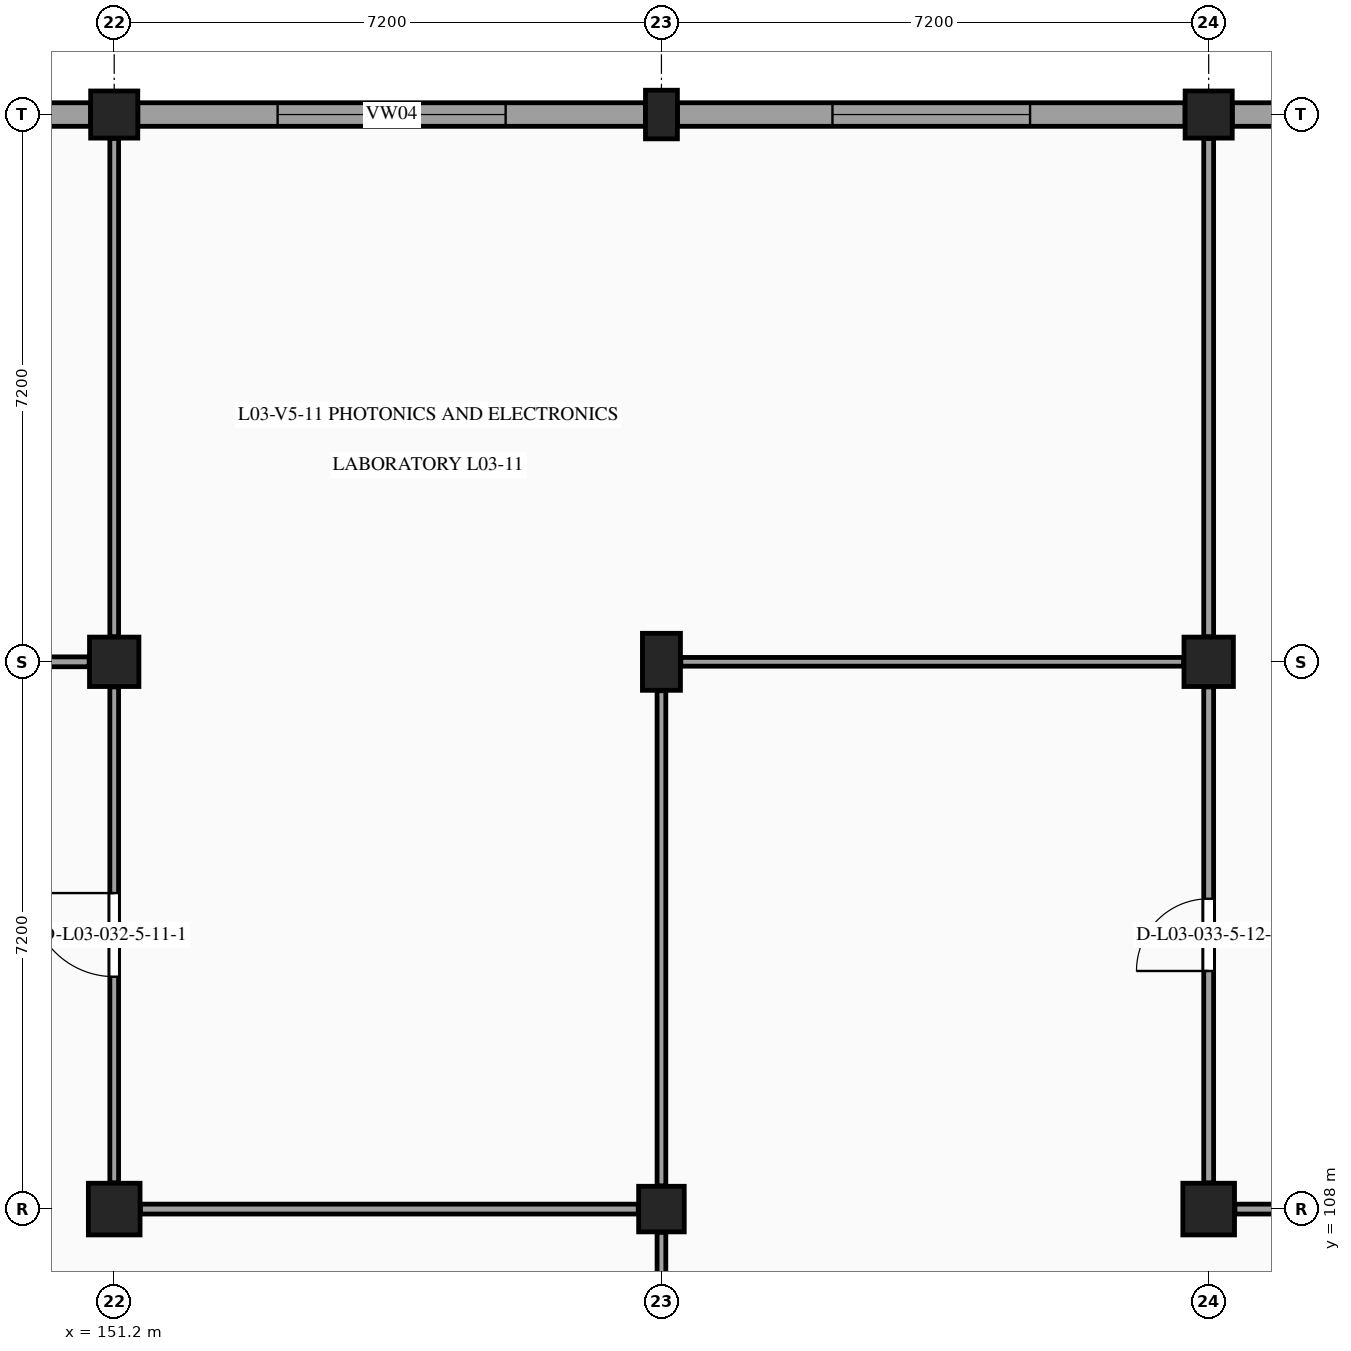
"""IFC4 building model, lengths in metres.
Left out: names, types, materials, properties, quantities, classifications, styles, units other than length and angle.
Written with IfcOpenShell. Run it as: python <this file> out.ifc"""

import sys

from ifc_helpers import new_model, si_unit, direction, frame, frame_2d, origin, origin_2d, place, context, subcontext, project, spatial, rectangle, extrude, element, fill, save


model = new_model("IFC4")
c1 = context("Model", 3, precision=1e-05, world=origin(), true_north=direction((0.0, 1.0)))
c2 = subcontext(c1, "Body", "Model", "MODEL_VIEW")
j1 = project(units=[si_unit("LENGTHUNIT", "METRE"), si_unit("PLANEANGLEUNIT", "RADIAN")], contexts=[c1])
p1 = place(None, origin())
s1 = spatial("IfcSite", under=j1, at=p1, CompositionType="ELEMENT")
p2 = place(p1, origin())
s2 = spatial("IfcBuilding", under=s1, at=p2, CompositionType="ELEMENT")
p3 = place(p2, frame((0.0, 0.0, 14.4)))
s3 = spatial("IfcBuildingStorey", under=s2, at=p3, CompositionType="ELEMENT", Elevation=14.4)
p4 = place(p3, frame((151.2, 108.0, 0.0), z_axis=(0.0, 0.0, 1.0), x_axis=(1.0, 0.0, 0.0)))
e1 = element("IfcColumn", 1, at=p4, inside=s3, PredefinedType="COLUMN", context=c2, shape_type="SweptSolid", body=[
    extrude(rectangle(XDim=0.68, YDim=0.68, at=origin_2d()), origin(), (0.0, 0.0, 1.0), 4.2),
])
p5 = place(p3, frame((151.2, 115.2, 0.0), z_axis=(0.0, 0.0, 1.0), x_axis=(1.0, 0.0, 0.0)))
e2 = element("IfcColumn", 2, at=p5, inside=s3, PredefinedType="COLUMN", context=c2, shape_type="SweptSolid", body=[
    extrude(rectangle(XDim=0.65, YDim=0.65, at=origin_2d()), origin(), (0.0, 0.0, 1.0), 4.2),
])
p6 = place(p3, frame((151.2, 122.4, 0.0), z_axis=(0.0, 0.0, 1.0), x_axis=(1.0, 0.0, 0.0)))
e3 = element("IfcColumn", 3, at=p6, inside=s3, PredefinedType="COLUMN", context=c2, shape_type="SweptSolid", body=[
    extrude(rectangle(XDim=0.62, YDim=0.62, at=origin_2d()), origin(), (0.0, 0.0, 1.0), 4.2),
])
p7 = place(p3, frame((158.4, 108.0, 0.0), z_axis=(0.0, 0.0, 1.0), x_axis=(1.0, 0.0, 0.0)))
e4 = element("IfcColumn", 4, at=p7, inside=s3, PredefinedType="COLUMN", context=c2, shape_type="SweptSolid", body=[
    extrude(rectangle(XDim=0.6, YDim=0.6, at=origin_2d()), origin(), (0.0, 0.0, 1.0), 4.2),
])
p8 = place(p3, frame((158.4, 115.2, 0.0), z_axis=(0.0, 0.0, 1.0), x_axis=(1.0, 0.0, 0.0)))
e5 = element("IfcColumn", 5, at=p8, inside=s3, PredefinedType="COLUMN", context=c2, shape_type="SweptSolid", body=[
    extrude(rectangle(XDim=0.5, YDim=0.75, at=origin_2d()), origin(), (0.0, 0.0, 1.0), 4.2),
])
p9 = place(p3, frame((158.4, 122.4, 0.0), z_axis=(0.0, 0.0, 1.0), x_axis=(1.0, 0.0, 0.0)))
e6 = element("IfcColumn", 6, at=p9, inside=s3, PredefinedType="PILASTER", context=c2, shape_type="SweptSolid", body=[
    extrude(rectangle(XDim=0.42, YDim=0.64, at=origin_2d()), origin(), (0.0, 0.0, 1.0), 4.2),
])
p10 = place(p3, frame((165.6, 108.0, 0.0), z_axis=(0.0, 0.0, 1.0), x_axis=(1.0, 0.0, 0.0)))
e7 = element("IfcColumn", 7, at=p10, inside=s3, PredefinedType="COLUMN", context=c2, shape_type="SweptSolid", body=[
    extrude(rectangle(XDim=0.68, YDim=0.68, at=origin_2d()), origin(), (0.0, 0.0, 1.0), 4.2),
])
p11 = place(p3, frame((165.6, 115.2, 0.0), z_axis=(0.0, 0.0, 1.0), x_axis=(1.0, 0.0, 0.0)))
e8 = element("IfcColumn", 8, at=p11, inside=s3, PredefinedType="COLUMN", context=c2, shape_type="SweptSolid", body=[
    extrude(rectangle(XDim=0.65, YDim=0.65, at=origin_2d()), origin(), (0.0, 0.0, 1.0), 4.2),
])
p12 = place(p3, frame((165.6, 122.4, 0.0), z_axis=(0.0, 0.0, 1.0), x_axis=(1.0, 0.0, 0.0)))
e9 = element("IfcColumn", 9, at=p12, inside=s3, PredefinedType="COLUMN", context=c2, shape_type="SweptSolid", body=[
    extrude(rectangle(XDim=0.62, YDim=0.62, at=origin_2d()), origin(), (0.0, 0.0, 1.0), 4.2),
])
p13 = place(p3, frame((144.21, 122.4, 0.0), z_axis=(0.0, 0.0, 1.0), x_axis=(1.0, 0.0, 0.0)))
e10 = element("IfcWall", 10, at=p13, inside=s3, PredefinedType="STANDARD", context=c2, shape_type="SweptSolid", body=[
    extrude(rectangle(XDim=6.68, YDim=0.31, at=frame_2d((3.34, 0.0))), origin(), (0.0, 0.0, 1.0), 3.185),
])
p14 = place(p13, frame((1.64, 0.0, 0.98)))
e11 = element("IfcOpeningElement", 11, at=p14, cuts=e10, PredefinedType="OPENING", context=c2, shape_type="SweptSolid", body=[
    extrude(rectangle(XDim=3.4, YDim=1.55, at=frame_2d((1.7, 0.775))), frame((0.0, 0.165, 0.0), z_axis=(0.0, -1.0, 0.0), x_axis=(1.0, 0.0, 0.0)), (0.0, 0.0, 1.0), 0.33),
])
p15 = place(p3, frame((151.51, 122.4, 0.0), z_axis=(0.0, 0.0, 1.0), x_axis=(1.0, 0.0, 0.0)))
e12 = element("IfcWall", 12, at=p15, inside=s3, PredefinedType="STANDARD", context=c2, shape_type="SweptSolid", body=[
    extrude(rectangle(XDim=6.68, YDim=0.31, at=frame_2d((3.34, 0.0))), origin(), (0.0, 0.0, 1.0), 3.185),
])
p16 = place(p15, frame((1.84, 0.0, 0.98)))
e13 = element("IfcOpeningElement", 13, at=p16, cuts=e12, PredefinedType="OPENING", context=c2, shape_type="SweptSolid", body=[
    extrude(rectangle(XDim=3.0, YDim=1.5, at=frame_2d((1.5, 0.75))), frame((0.0, 0.165, 0.0), z_axis=(0.0, -1.0, 0.0), x_axis=(1.0, 0.0, 0.0)), (0.0, 0.0, 1.0), 0.33),
])
p17 = place(p3, frame((158.61, 122.4, 0.0), z_axis=(0.0, 0.0, 1.0), x_axis=(1.0, 0.0, 0.0)))
e14 = element("IfcWall", 14, at=p17, inside=s3, PredefinedType="STANDARD", context=c2, shape_type="SweptSolid", body=[
    extrude(rectangle(XDim=6.68, YDim=0.31, at=frame_2d((3.34, 0.0))), origin(), (0.0, 0.0, 1.0), 3.185),
])
p18 = place(p17, frame((2.04, 0.0, 0.98)))
e15 = element("IfcOpeningElement", 15, at=p18, cuts=e14, PredefinedType="OPENING", context=c2, shape_type="SweptSolid", body=[
    extrude(rectangle(XDim=2.6, YDim=1.5, at=frame_2d((1.3, 0.75))), frame((0.0, 0.165, 0.0), z_axis=(0.0, -1.0, 0.0), x_axis=(1.0, 0.0, 0.0)), (0.0, 0.0, 1.0), 0.33),
])
p19 = place(p3, frame((165.91, 122.4, 0.0), z_axis=(0.0, 0.0, 1.0), x_axis=(1.0, 0.0, 0.0)))
e16 = element("IfcWall", 16, at=p19, inside=s3, PredefinedType="STANDARD", context=c2, shape_type="SweptSolid", body=[
    extrude(rectangle(XDim=6.68, YDim=0.31, at=frame_2d((3.34, 0.0))), origin(), (0.0, 0.0, 1.0), 3.185),
])
p20 = place(p19, frame((2.24, 0.0, 0.98)))
e17 = element("IfcOpeningElement", 17, at=p20, cuts=e16, PredefinedType="OPENING", context=c2, shape_type="SweptSolid", body=[
    extrude(rectangle(XDim=2.2, YDim=1.45, at=frame_2d((1.1, 0.725))), frame((0.0, 0.165, 0.0), z_axis=(0.0, -1.0, 0.0), x_axis=(1.0, 0.0, 0.0)), (0.0, 0.0, 1.0), 0.33),
])
p21 = place(p3, frame((151.2, 108.345, 0.0), z_axis=(0.0, 0.0, 1.0), x_axis=(0.0, 1.0, 0.0)))
e18 = element("IfcWall", 18, at=p21, inside=s3, PredefinedType="PARTITIONING", context=c2, shape_type="SweptSolid", body=[
    extrude(rectangle(XDim=6.525, YDim=0.115, at=frame_2d((3.263, 0.0))), origin(), (0.0, 0.0, 1.0), 3.245),
])
p22 = place(p21, frame((2.712, 0.0, 0.0)))
e19 = element("IfcOpeningElement", 19, at=p22, cuts=e18, PredefinedType="OPENING", context=c2, shape_type="SweptSolid", body=[
    extrude(rectangle(XDim=1.1, YDim=2.15, at=frame_2d((0.55, 1.075))), frame((0.0, 0.067, 0.0), z_axis=(0.0, -1.0, 0.0), x_axis=(1.0, 0.0, 0.0)), (0.0, 0.0, 1.0), 0.135),
])
p23 = place(p3, frame((144.255, 115.2, 0.0), z_axis=(0.0, 0.0, 1.0), x_axis=(1.0, 0.0, 0.0)))
e20 = element("IfcWall", 20, at=p23, inside=s3, PredefinedType="PARTITIONING", context=c2, shape_type="SweptSolid", body=[
    extrude(rectangle(XDim=6.615, YDim=0.13, at=frame_2d((3.308, 0.0))), origin(), (0.0, 0.0, 1.0), 3.215),
])
p24 = place(p3, frame((151.2, 115.53, 0.0), z_axis=(0.0, 0.0, 1.0), x_axis=(0.0, 1.0, 0.0)))
e21 = element("IfcWall", 21, at=p24, inside=s3, PredefinedType="PARTITIONING", context=c2, shape_type="SweptSolid", body=[
    extrude(rectangle(XDim=6.555, YDim=0.115, at=frame_2d((3.277, 0.0))), origin(), (0.0, 0.0, 1.0), 3.245),
])
p25 = place(p3, frame((158.4, 101.115, 0.0), z_axis=(0.0, 0.0, 1.0), x_axis=(0.0, 1.0, 0.0)))
e22 = element("IfcWall", 22, at=p25, inside=s3, PredefinedType="PARTITIONING", context=c2, shape_type="SweptSolid", body=[
    extrude(rectangle(XDim=6.58, YDim=0.115, at=frame_2d((3.29, 0.0))), origin(), (0.0, 0.0, 1.0), 3.25),
])
p26 = place(p25, frame((2.55, 0.0, 0.0)))
e23 = element("IfcOpeningElement", 23, at=p26, cuts=e22, PredefinedType="OPENING", context=c2, shape_type="SweptSolid", body=[
    extrude(rectangle(XDim=1.48, YDim=2.28, at=frame_2d((0.74, 1.14))), frame((0.0, 0.067, 0.0), z_axis=(0.0, -1.0, 0.0), x_axis=(1.0, 0.0, 0.0)), (0.0, 0.0, 1.0), 0.135),
])
p27 = place(p3, frame((151.545, 108.0, 0.0), z_axis=(0.0, 0.0, 1.0), x_axis=(1.0, 0.0, 0.0)))
e24 = element("IfcWall", 24, at=p27, inside=s3, PredefinedType="PARTITIONING", context=c2, shape_type="SweptSolid", body=[
    extrude(rectangle(XDim=6.55, YDim=0.13, at=frame_2d((3.275, 0.0))), origin(), (0.0, 0.0, 1.0), 3.22),
])
p28 = place(p3, frame((158.4, 108.305, 0.0), z_axis=(0.0, 0.0, 1.0), x_axis=(0.0, 1.0, 0.0)))
e25 = element("IfcWall", 25, at=p28, inside=s3, PredefinedType="PARTITIONING", context=c2, shape_type="SweptSolid", body=[
    extrude(rectangle(XDim=6.515, YDim=0.115, at=frame_2d((3.258, 0.0))), origin(), (0.0, 0.0, 1.0), 3.245),
])
p29 = place(p3, frame((165.6, 108.345, 0.0), z_axis=(0.0, 0.0, 1.0), x_axis=(0.0, 1.0, 0.0)))
e26 = element("IfcWall", 26, at=p29, inside=s3, PredefinedType="PARTITIONING", context=c2, shape_type="SweptSolid", body=[
    extrude(rectangle(XDim=6.525, YDim=0.13, at=frame_2d((3.263, 0.0))), origin(), (0.0, 0.0, 1.0), 3.245),
])
p30 = place(p29, frame((2.788, 0.0, 0.0)))
e27 = element("IfcOpeningElement", 27, at=p30, cuts=e26, PredefinedType="OPENING", context=c2, shape_type="SweptSolid", body=[
    extrude(rectangle(XDim=0.95, YDim=2.15, at=frame_2d((0.475, 1.075))), frame((0.0, 0.075, 0.0), z_axis=(0.0, -1.0, 0.0), x_axis=(1.0, 0.0, 0.0)), (0.0, 0.0, 1.0), 0.15),
])
p31 = place(p3, frame((158.655, 115.2, 0.0), z_axis=(0.0, 0.0, 1.0), x_axis=(1.0, 0.0, 0.0)))
e28 = element("IfcWall", 28, at=p31, inside=s3, PredefinedType="PARTITIONING", context=c2, shape_type="SweptSolid", body=[
    extrude(rectangle(XDim=6.615, YDim=0.115, at=frame_2d((3.308, 0.0))), origin(), (0.0, 0.0, 1.0), 3.24),
])
p32 = place(p3, frame((165.6, 115.53, 0.0), z_axis=(0.0, 0.0, 1.0), x_axis=(0.0, 1.0, 0.0)))
e29 = element("IfcWall", 29, at=p32, inside=s3, PredefinedType="PARTITIONING", context=c2, shape_type="SweptSolid", body=[
    extrude(rectangle(XDim=6.555, YDim=0.13, at=frame_2d((3.277, 0.0))), origin(), (0.0, 0.0, 1.0), 3.245),
])
p33 = place(p3, frame((165.945, 108.0, 0.0), z_axis=(0.0, 0.0, 1.0), x_axis=(1.0, 0.0, 0.0)))
e30 = element("IfcWall", 30, at=p33, inside=s3, PredefinedType="PARTITIONING", context=c2, shape_type="SweptSolid", body=[
    extrude(rectangle(XDim=6.55, YDim=0.13, at=frame_2d((3.275, 0.0))), origin(), (0.0, 0.0, 1.0), 3.28),
])
p34 = place(p16, origin())
e31 = element("IfcWindow", 31, at=p34, inside=s3, PartitioningType="SINGLE_PANEL", PredefinedType="WINDOW", context=c2, shape_type="SweptSolid", body=[
    extrude(rectangle(XDim=3.0, YDim=1.5, at=frame_2d((1.5, 0.75))), frame((0.0, -0.03, 0.0), z_axis=(0.0, -1.0, 0.0), x_axis=(1.0, 0.0, 0.0)), (0.0, 0.0, 1.0), 0.06),
])
fill(e13, e31)
p35 = place(p18, origin())
e32 = element("IfcWindow", 32, at=p35, inside=s3, PartitioningType="SINGLE_PANEL", PredefinedType="WINDOW", context=c2, shape_type="SweptSolid", body=[
    extrude(rectangle(XDim=2.6, YDim=1.5, at=frame_2d((1.3, 0.75))), frame((0.0, -0.03, 0.0), z_axis=(0.0, -1.0, 0.0), x_axis=(1.0, 0.0, 0.0)), (0.0, 0.0, 1.0), 0.06),
])
fill(e15, e32)
p36 = place(p22, origin())
e33 = element("IfcDoor", 33, at=p36, inside=s3, OperationType="SINGLE_SWING_RIGHT", PredefinedType="DOOR", context=c2, shape_type="SweptSolid", body=[
    extrude(rectangle(XDim=1.1, YDim=2.15, at=frame_2d((0.55, 1.075))), frame((0.0, 0.025, 0.0), z_axis=(0.0, -1.0, 0.0), x_axis=(1.0, 0.0, 0.0)), (0.0, 0.0, 1.0), 0.05),
])
fill(e19, e33)
p37 = place(p30, origin())
e34 = element("IfcDoor", 34, at=p37, inside=s3, OperationType="SINGLE_SWING_LEFT", PredefinedType="DOOR", context=c2, shape_type="SweptSolid", body=[
    extrude(rectangle(XDim=0.95, YDim=2.15, at=frame_2d((0.475, 1.075))), frame((0.0, 0.025, 0.0), z_axis=(0.0, -1.0, 0.0), x_axis=(1.0, 0.0, 0.0)), (0.0, 0.0, 1.0), 0.05),
])
fill(e27, e34)
save(model, sys.argv[1])
